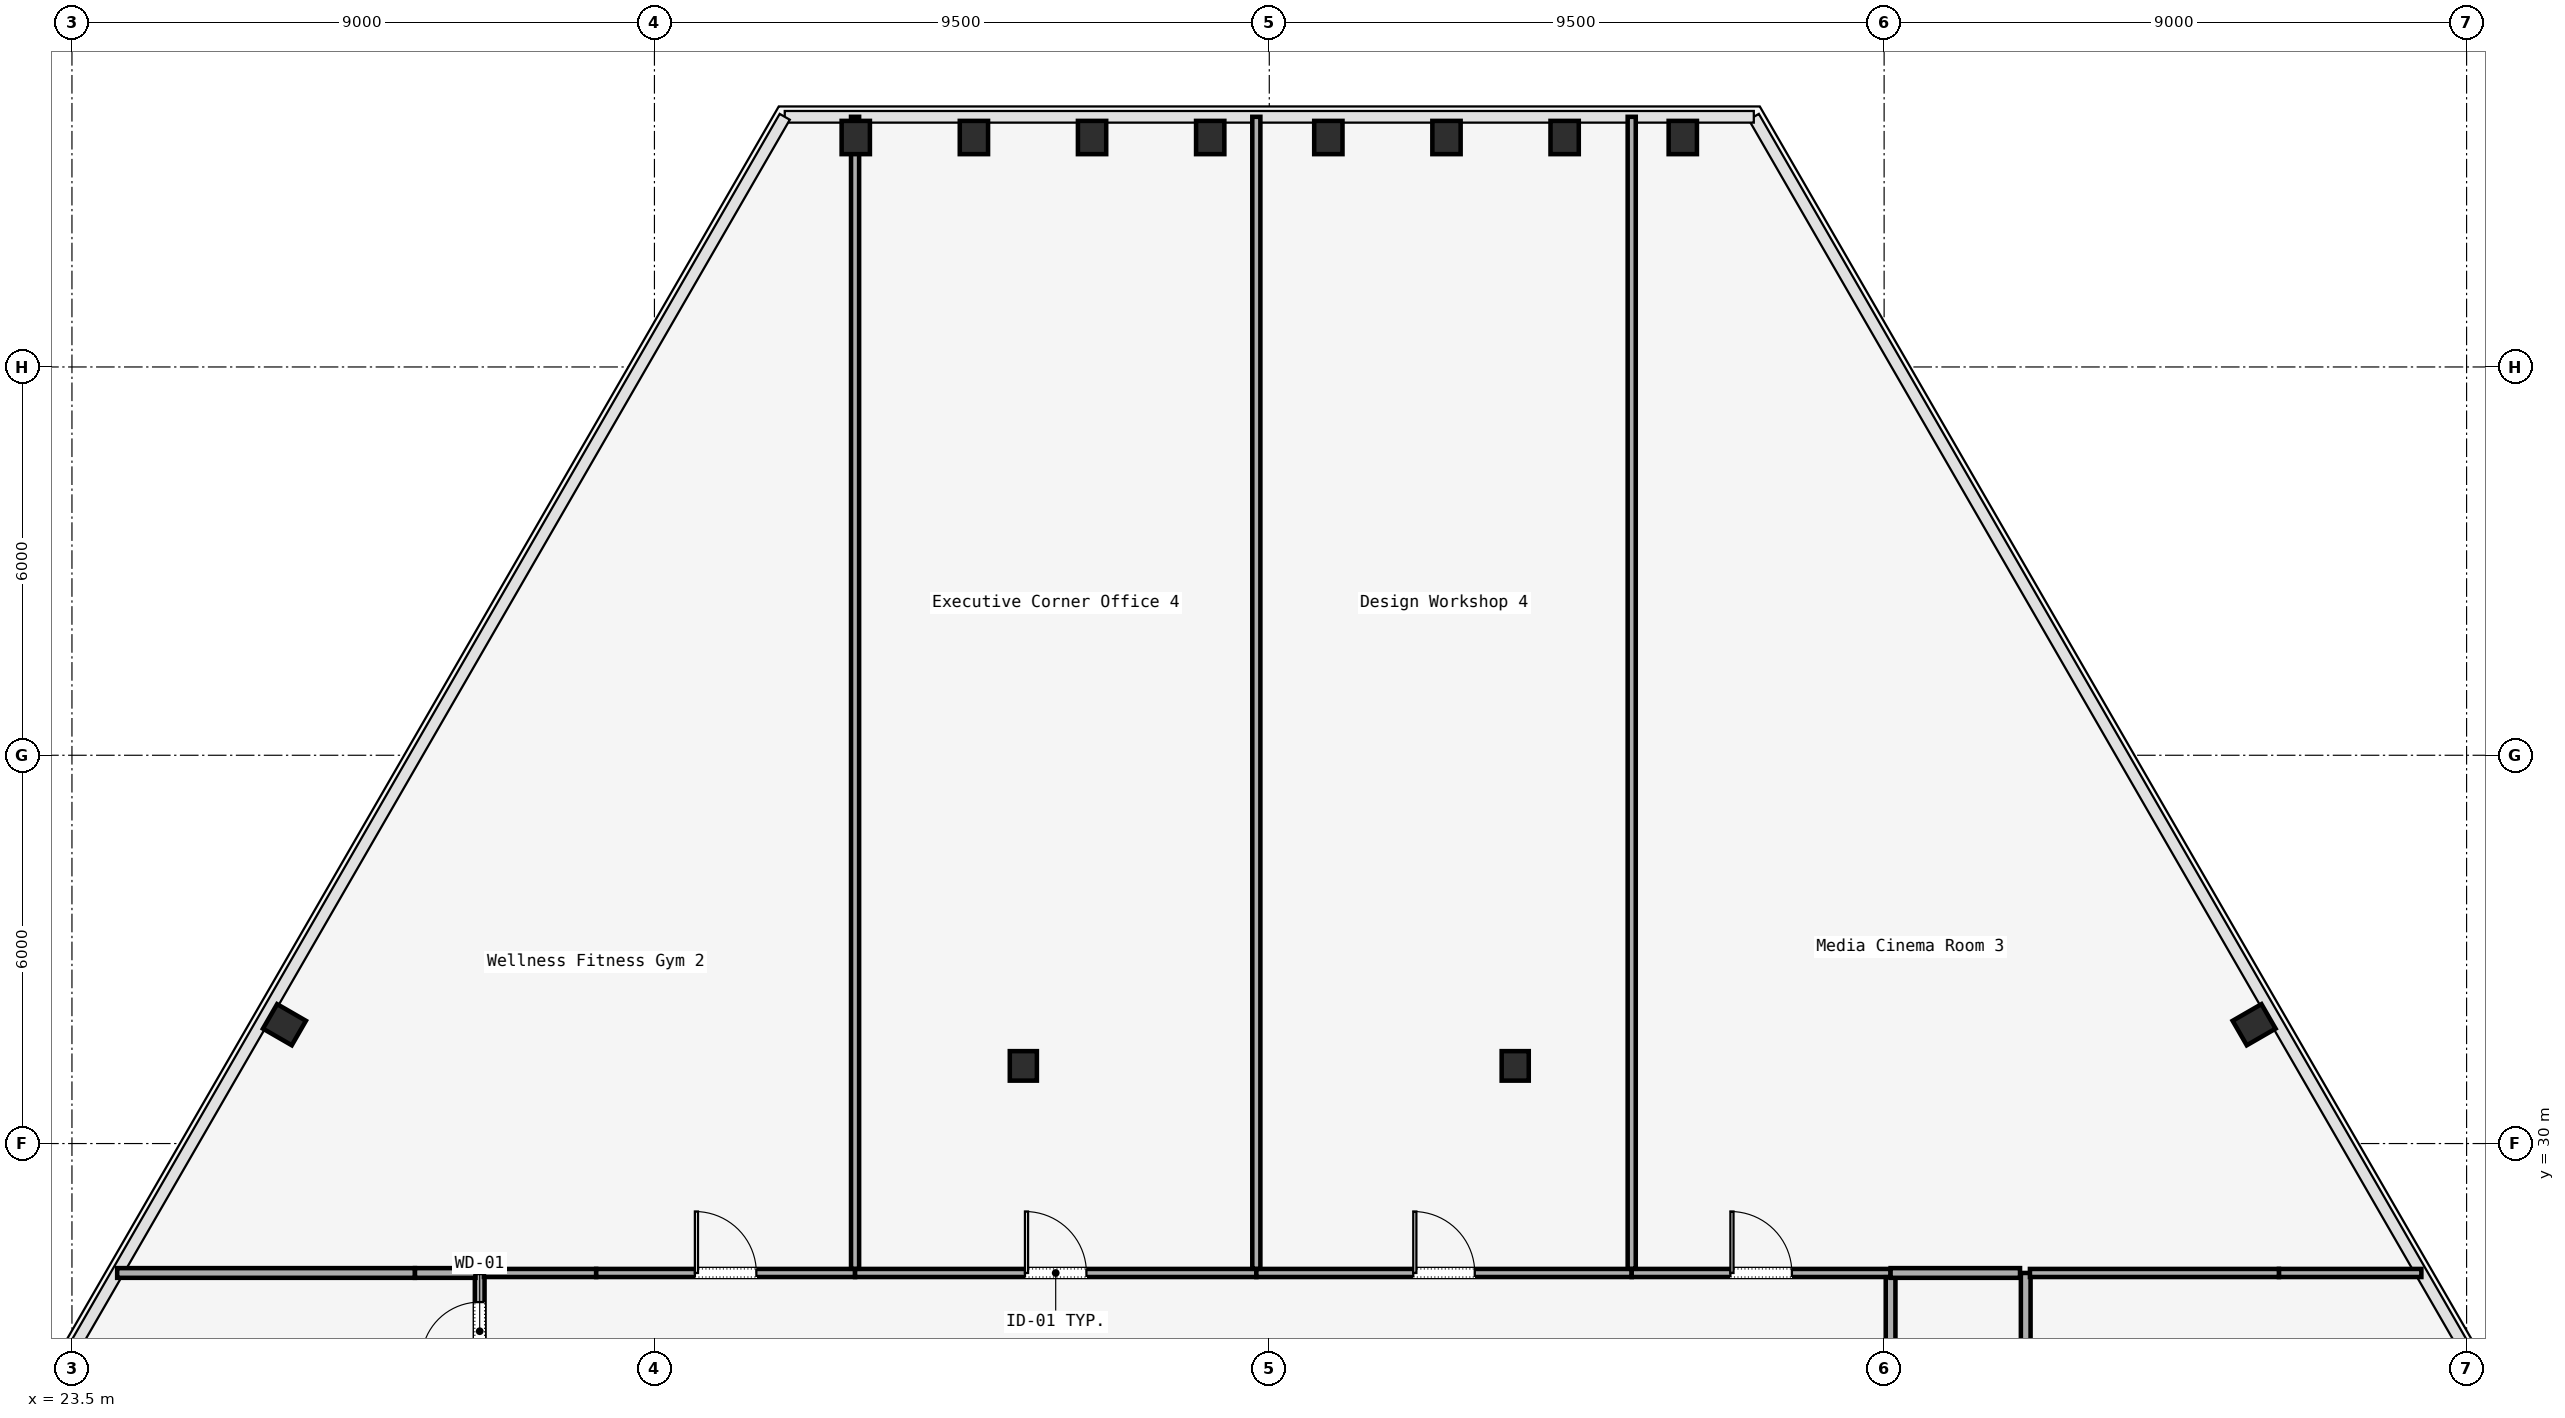
"""IFC4 building model, lengths in metres.
Left out: names, types, materials, properties, quantities, classifications, styles, units other than length and angle.
Written with IfcOpenShell. Run it as: python <this file> out.ifc"""

import sys

from ifc_helpers import new_model, si_unit, direction, frame, frame_2d, origin, origin_2d, place, context, subcontext, project, spatial, rectangle, i_section, extrude, element, fill, save


model = new_model("IFC4")
c1 = context("Model", 3, precision=1e-05, world=origin(), true_north=direction((0.0, 1.0)))
c2 = subcontext(c1, "Body", "Model", "MODEL_VIEW")
j1 = project(units=[si_unit("LENGTHUNIT", "METRE"), si_unit("PLANEANGLEUNIT", "RADIAN")], contexts=[c1])
p1 = place(None, origin())
s1 = spatial("IfcSite", under=j1, at=p1, CompositionType="ELEMENT")
p2 = place(p1, origin())
s2 = spatial("IfcBuilding", under=s1, at=p2, CompositionType="ELEMENT")
p3 = place(p2, frame((0.0, 0.0, 70.2)))
s3 = spatial("IfcBuildingStorey", under=s2, at=p3, CompositionType="ELEMENT", Elevation=70.2)
for number, where, z_axis, x_axis in (
    (1, (38.2, 31.2, 0.0), (0.0, 0.0, 1.0), (1.0, 0.0, 0.0)),
    (2, (45.8, 31.2, 0.0), (0.0, 0.0, 1.0), (1.0, 0.0, 0.0)),
):
    element("IfcColumn", number, at=place(p3, frame(where, z_axis=z_axis, x_axis=x_axis)), inside=s3, PredefinedType="COLUMN", context=c2, shape_type="SweptSolid", body=[
        extrude(i_section(OverallWidth=0.418, OverallDepth=0.456, WebThickness=0.042, FlangeThickness=0.067, FilletRadius=0.015, at=origin_2d()), origin(), (0.0, 0.0, 1.0), 3.58),
    ])
for number, where, z_axis, x_axis in (
    (3, (57.217, 31.836, 0.0), (0.0, 0.0, 1.0), (-0.5, 0.866, 0.0)),
    (4, (48.389, 45.546, 0.0), (0.0, 0.0, 1.0), (1.0, 0.0, 0.0)),
    (5, (46.564, 45.546, 0.0), (0.0, 0.0, 1.0), (1.0, 0.0, 0.0)),
    (6, (44.738, 45.546, 0.0), (0.0, 0.0, 1.0), (1.0, 0.0, 0.0)),
    (7, (42.913, 45.546, 0.0), (0.0, 0.0, 1.0), (1.0, 0.0, 0.0)),
    (8, (41.087, 45.546, 0.0), (0.0, 0.0, 1.0), (1.0, 0.0, 0.0)),
    (9, (39.262, 45.546, 0.0), (0.0, 0.0, 1.0), (1.0, 0.0, 0.0)),
    (10, (37.436, 45.546, 0.0), (0.0, 0.0, 1.0), (1.0, 0.0, 0.0)),
    (11, (35.611, 45.546, 0.0), (0.0, 0.0, 1.0), (1.0, 0.0, 0.0)),
    (12, (26.783, 31.836, 0.0), (0.0, 0.0, 1.0), (0.5, 0.866, 0.0)),
):
    element("IfcColumn", number, at=place(p3, frame(where, z_axis=z_axis, x_axis=x_axis)), inside=s3, PredefinedType="COLUMN", context=c2, shape_type="SweptSolid", body=[
        extrude(i_section(OverallWidth=0.437, OverallDepth=0.514, WebThickness=0.061, FlangeThickness=0.077, FilletRadius=0.015, at=origin_2d()), origin(), (0.0, 0.0, 1.0), 3.58),
    ])
p4 = place(p3, frame((29.8, 26.2, 0.0), z_axis=(0.0, 0.0, 1.0), x_axis=(0.0, 1.0, 0.0)))
e13 = element("IfcWall", 13, at=p4, inside=s3, PredefinedType="PARTITIONING", context=c2, shape_type="SweptSolid", body=[
    extrude(rectangle(XDim=1.8, YDim=0.15, at=frame_2d((0.9, 0.0))), origin(), (0.0, 0.0, 1.0), 2.95),
])
p5 = place(p4, frame((0.45, 0.0, 0.0)))
e14 = element("IfcOpeningElement", 14, at=p5, cuts=e13, PredefinedType="OPENING", context=c2, shape_type="SweptSolid", body=[
    extrude(rectangle(XDim=0.9, YDim=2.15, at=frame_2d((0.45, 1.075))), frame((0.0, 0.075, 0.0), z_axis=(0.0, -1.0, 0.0), x_axis=(1.0, 0.0, 0.0)), (0.0, 0.0, 1.0), 0.15),
])
p6 = place(p3, frame((29.865, 28.0, 0.0), z_axis=(0.0, 0.0, 1.0), x_axis=(1.0, 0.0, 0.0)))
e15 = element("IfcWall", 15, at=p6, inside=s3, PredefinedType="PARTITIONING", context=c2, shape_type="SweptSolid", body=[
    extrude(rectangle(XDim=1.735, YDim=0.125, at=frame_2d((0.868, 0.0))), origin(), (0.0, 0.0, 1.0), 2.95),
])
p7 = place(p3, frame((31.6, 28.0, 0.0), z_axis=(0.0, 0.0, 1.0), x_axis=(1.0, 0.0, 0.0)))
e16 = element("IfcWall", 16, at=p7, inside=s3, PredefinedType="PARTITIONING", context=c2, shape_type="SweptSolid", body=[
    extrude(rectangle(XDim=4.0, YDim=0.125, at=frame_2d((2.0, 0.0))), origin(), (0.0, 0.0, 1.0), 2.95),
])
p8 = place(p7, frame((1.525, 0.0, 0.0)))
e17 = element("IfcOpeningElement", 17, at=p8, cuts=e16, PredefinedType="OPENING", context=c2, shape_type="SweptSolid", body=[
    extrude(rectangle(XDim=0.95, YDim=2.2, at=frame_2d((0.475, 1.1))), frame((0.0, 0.062, 0.0), z_axis=(0.0, -1.0, 0.0), x_axis=(1.0, 0.0, 0.0)), (0.0, 0.0, 1.0), 0.125),
])
p9 = place(p3, frame((35.6, 28.0, 0.0), z_axis=(0.0, 0.0, 1.0), x_axis=(1.0, 0.0, 0.0)))
e18 = element("IfcWall", 18, at=p9, inside=s3, PredefinedType="PARTITIONING", context=c2, shape_type="SweptSolid", body=[
    extrude(rectangle(XDim=6.2, YDim=0.125, at=frame_2d((3.1, 0.0))), origin(), (0.0, 0.0, 1.0), 2.95),
])
p10 = place(p9, frame((2.625, 0.0, 0.0)))
e19 = element("IfcOpeningElement", 19, at=p10, cuts=e18, PredefinedType="OPENING", context=c2, shape_type="SweptSolid", body=[
    extrude(rectangle(XDim=0.95, YDim=2.2, at=frame_2d((0.475, 1.1))), frame((0.0, 0.062, 0.0), z_axis=(0.0, -1.0, 0.0), x_axis=(1.0, 0.0, 0.0)), (0.0, 0.0, 1.0), 0.125),
])
p11 = place(p3, frame((41.8, 28.0, 0.0), z_axis=(0.0, 0.0, 1.0), x_axis=(1.0, 0.0, 0.0)))
e20 = element("IfcWall", 20, at=p11, inside=s3, PredefinedType="PARTITIONING", context=c2, shape_type="SweptSolid", body=[
    extrude(rectangle(XDim=5.8, YDim=0.125, at=frame_2d((2.9, 0.0))), origin(), (0.0, 0.0, 1.0), 2.95),
])
p12 = place(p11, frame((2.425, 0.0, 0.0)))
e21 = element("IfcOpeningElement", 21, at=p12, cuts=e20, PredefinedType="OPENING", context=c2, shape_type="SweptSolid", body=[
    extrude(rectangle(XDim=0.95, YDim=2.2, at=frame_2d((0.475, 1.1))), frame((0.0, 0.062, 0.0), z_axis=(0.0, -1.0, 0.0), x_axis=(1.0, 0.0, 0.0)), (0.0, 0.0, 1.0), 0.125),
])
p13 = place(p3, frame((47.6, 28.0, 0.0), z_axis=(0.0, 0.0, 1.0), x_axis=(1.0, 0.0, 0.0)))
e22 = element("IfcWall", 22, at=p13, inside=s3, PredefinedType="PARTITIONING", context=c2, shape_type="SweptSolid", body=[
    extrude(rectangle(XDim=4.0, YDim=0.125, at=frame_2d((2.0, 0.0))), origin(), (0.0, 0.0, 1.0), 2.95),
])
p14 = place(p13, frame((1.525, 0.0, 0.0)))
e23 = element("IfcOpeningElement", 23, at=p14, cuts=e22, PredefinedType="OPENING", context=c2, shape_type="SweptSolid", body=[
    extrude(rectangle(XDim=0.95, YDim=2.2, at=frame_2d((0.475, 1.1))), frame((0.0, 0.062, 0.0), z_axis=(0.0, -1.0, 0.0), x_axis=(1.0, 0.0, 0.0)), (0.0, 0.0, 1.0), 0.125),
])
p15 = place(p3, frame((51.6, 27.935, 0.0), z_axis=(0.0, 0.0, 1.0), x_axis=(0.0, -1.0, 0.0)))
e24 = element("IfcWall", 24, at=p15, inside=s3, PredefinedType="PARTITIONING", context=c2, shape_type="SweptSolid", body=[
    extrude(rectangle(XDim=1.735, YDim=0.15, at=frame_2d((0.868, 0.0))), origin(), (0.0, 0.0, 1.0), 2.95),
])
p16 = place(p3, frame((57.6, 28.0, 0.0), z_axis=(0.0, 0.0, 1.0), x_axis=(1.0, 0.0, 0.0)))
e25 = element("IfcWall", 25, at=p16, inside=s3, PredefinedType="PARTITIONING", context=c2, shape_type="SweptSolid", body=[
    extrude(rectangle(XDim=2.201, YDim=0.125, at=frame_2d((1.101, 0.0))), origin(), (0.0, 0.0, 1.0), 2.95),
])
p17 = place(p3, frame((53.688, 17.065, 0.0), z_axis=(0.0, 0.0, 1.0), x_axis=(0.0, 1.0, 0.0)))
e26 = element("IfcWall", 26, at=p17, inside=s3, PredefinedType="PARTITIONING", context=c2, shape_type="SweptSolid", body=[
    extrude(rectangle(XDim=10.935, YDim=0.15, at=frame_2d((5.468, 0.0))), origin(), (0.0, 0.0, 1.0), 2.95),
])
p18 = place(p3, frame((53.753, 28.0, 0.0), z_axis=(0.0, 0.0, 1.0), x_axis=(1.0, 0.0, 0.0)))
e27 = element("IfcWall", 27, at=p18, inside=s3, PredefinedType="PARTITIONING", context=c2, shape_type="SweptSolid", body=[
    extrude(rectangle(XDim=3.847, YDim=0.125, at=frame_2d((1.924, 0.0))), origin(), (0.0, 0.0, 1.0), 2.95),
])
p19 = place(p3, frame((51.6, 28.0, 0.0), z_axis=(0.0, 0.0, 1.0), x_axis=(1.0, 0.0, 0.0)))
e28 = element("IfcWall", 28, at=p19, inside=s3, PredefinedType="PARTITIONING", context=c2, shape_type="SweptSolid", body=[
    extrude(rectangle(XDim=2.0, YDim=0.15, at=frame_2d((1.0, 0.0))), origin(), (0.0, 0.0, 1.0), 2.95),
])
p20 = place(p3, frame((24.199, 28.0, 0.0), z_axis=(0.0, 0.0, 1.0), x_axis=(1.0, 0.0, 0.0)))
e29 = element("IfcWall", 29, at=p20, inside=s3, PredefinedType="PARTITIONING", context=c2, shape_type="SweptSolid", body=[
    extrude(rectangle(XDim=4.601, YDim=0.15, at=frame_2d((2.301, 0.0))), origin(), (0.0, 0.0, 1.0), 2.95),
])
p21 = place(p3, frame((28.8, 28.0, 0.0), z_axis=(0.0, 0.0, 1.0), x_axis=(1.0, 0.0, 0.0)))
e30 = element("IfcWall", 30, at=p21, inside=s3, PredefinedType="PARTITIONING", context=c2, shape_type="SweptSolid", body=[
    extrude(rectangle(XDim=0.935, YDim=0.15, at=frame_2d((0.468, 0.0))), origin(), (0.0, 0.0, 1.0), 2.95),
])
for number, where, z_axis, x_axis in (
    (31, (35.6, 45.865, 0.0), (0.0, 0.0, 1.0), (0.0, -1.0, 0.0)),
    (32, (47.6, 28.065, 0.0), (0.0, 0.0, 1.0), (0.0, 1.0, 0.0)),
    (33, (41.8, 45.865, 0.0), (0.0, 0.0, 1.0), (0.0, -1.0, 0.0)),
):
    element("IfcWall", number, at=place(p3, frame(where, z_axis=z_axis, x_axis=x_axis)), inside=s3, PredefinedType="PARTITIONING", context=c2, shape_type="SweptSolid", body=[
        extrude(rectangle(XDim=17.801, YDim=0.125, at=frame_2d((8.9, 0.0))), origin(), (0.0, 0.0, 1.0), 2.95),
    ])
p22 = place(p5, origin())
e34 = element("IfcDoor", 34, at=p22, inside=s3, OperationType="SINGLE_SWING_LEFT", PredefinedType="DOOR", context=c2, shape_type="SweptSolid", body=[
    extrude(rectangle(XDim=0.9, YDim=2.15, at=frame_2d((0.45, 1.075))), frame((0.0, 0.025, 0.0), z_axis=(0.0, -1.0, 0.0), x_axis=(1.0, 0.0, 0.0)), (0.0, 0.0, 1.0), 0.05),
])
fill(e14, e34)
p23 = place(p8, origin())
e35 = element("IfcDoor", 35, at=p23, inside=s3, OperationType="SINGLE_SWING_RIGHT", PredefinedType="DOOR", context=c2, shape_type="SweptSolid", body=[
    extrude(rectangle(XDim=0.95, YDim=2.2, at=frame_2d((0.475, 1.1))), frame((0.0, 0.025, 0.0), z_axis=(0.0, -1.0, 0.0), x_axis=(1.0, 0.0, 0.0)), (0.0, 0.0, 1.0), 0.05),
])
fill(e17, e35)
p24 = place(p14, origin())
e36 = element("IfcDoor", 36, at=p24, inside=s3, OperationType="SINGLE_SWING_LEFT", PredefinedType="DOOR", context=c2, shape_type="SweptSolid", body=[
    extrude(rectangle(XDim=0.95, YDim=2.2, at=frame_2d((0.475, 1.1))), frame((0.0, 0.025, 0.0), z_axis=(0.0, -1.0, 0.0), x_axis=(1.0, 0.0, 0.0)), (0.0, 0.0, 1.0), 0.05),
])
fill(e23, e36)
p25 = place(p10, origin())
e37 = element("IfcDoor", 37, at=p25, inside=s3, OperationType="SINGLE_SWING_RIGHT", PredefinedType="DOOR", context=c2, shape_type="SweptSolid", body=[
    extrude(rectangle(XDim=0.95, YDim=2.2, at=frame_2d((0.475, 1.1))), frame((0.0, 0.025, 0.0), z_axis=(0.0, -1.0, 0.0), x_axis=(1.0, 0.0, 0.0)), (0.0, 0.0, 1.0), 0.05),
])
fill(e19, e37)
p26 = place(p12, origin())
e38 = element("IfcDoor", 38, at=p26, inside=s3, OperationType="SINGLE_SWING_LEFT", PredefinedType="DOOR", context=c2, shape_type="SweptSolid", body=[
    extrude(rectangle(XDim=0.95, YDim=2.2, at=frame_2d((0.475, 1.1))), frame((0.0, 0.025, 0.0), z_axis=(0.0, -1.0, 0.0), x_axis=(1.0, 0.0, 0.0)), (0.0, 0.0, 1.0), 0.05),
])
fill(e21, e38)
save(model, sys.argv[1])
